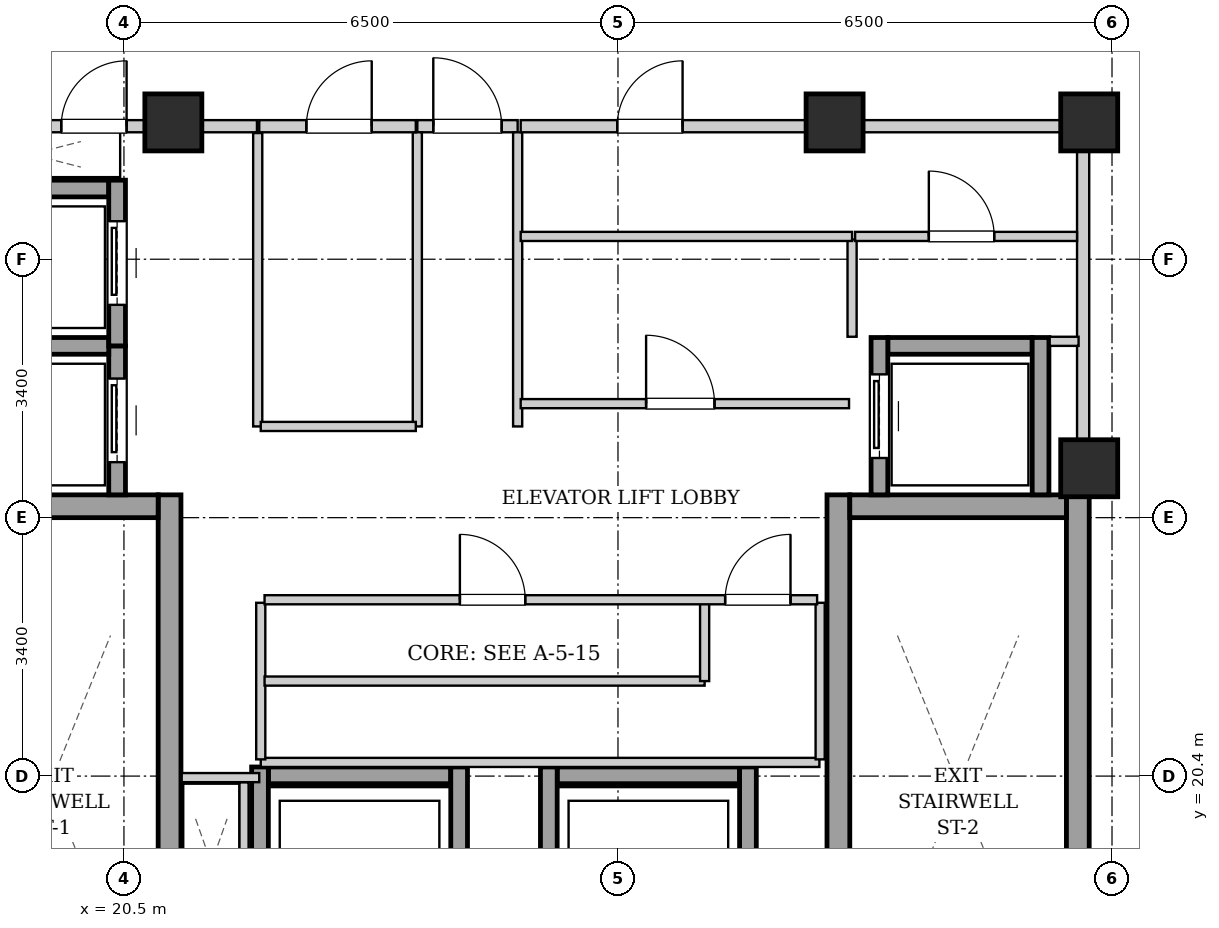
"""IFC4 building model, lengths in metres.
Left out: names, types, materials, properties, quantities, classifications, styles, units other than length and angle.
Written with IfcOpenShell. Run it as: python <this file> out.ifc"""

import sys

from ifc_helpers import new_model, si_unit, direction, frame, frame_2d, origin, origin_2d, place, context, subcontext, project, spatial, rectangle, extrude, element, fill, save


model = new_model("IFC4")
c1 = context("Model", 3, precision=1e-05, world=origin(), true_north=direction((0.0, 1.0)))
c2 = subcontext(c1, "Body", "Model", "MODEL_VIEW")
j1 = project(units=[si_unit("LENGTHUNIT", "METRE"), si_unit("PLANEANGLEUNIT", "RADIAN")], contexts=[c1])
p1 = place(None, origin())
s1 = spatial("IfcSite", under=j1, at=p1, CompositionType="ELEMENT")
p2 = place(p1, origin())
s2 = spatial("IfcBuilding", under=s1, at=p2, CompositionType="ELEMENT")
p3 = place(p2, frame((0.0, 0.0, 220.7)))
s3 = spatial("IfcBuildingStorey", under=s2, at=p3, CompositionType="ELEMENT", Elevation=220.7)
for number, where, z_axis, x_axis in (
    (1, (21.15, 29.0, 0.0), (0.0, 0.0, 1.0), (1.0, 0.0, 0.0)),
    (2, (29.85, 29.0, 0.0), (0.0, 0.0, 1.0), (1.0, 0.0, 0.0)),
    (3, (33.2, 29.0, 0.0), (0.0, 0.0, 1.0), (1.0, 0.0, 0.0)),
    (4, (33.2, 24.45, 0.0), (0.0, 0.0, 1.0), (1.0, 0.0, 0.0)),
):
    element("IfcColumn", number, at=place(p3, frame(where, z_axis=z_axis, x_axis=x_axis)), inside=s3, PredefinedType="COLUMN", context=c2, shape_type="SweptSolid", body=[
        extrude(rectangle(XDim=0.75, YDim=0.75, at=origin_2d()), origin(), (0.0, 0.0, 1.0), 3.4),
    ])
p4 = place(p3, frame((21.1, 15.1, 0.0), z_axis=(0.0, 0.0, 1.0), x_axis=(0.0, 1.0, 0.0)))
e5 = element("IfcWall", 5, at=p4, inside=s3, PredefinedType="SHEAR", context=c2, shape_type="SweptSolid", body=[
    extrude(rectangle(XDim=9.0, YDim=0.3, at=frame_2d((4.5, 0.0))), origin(), (0.0, 0.0, 1.0), 3.14),
])
p5 = place(p3, frame((18.1, 23.95, 0.0), z_axis=(0.0, 0.0, 1.0), x_axis=(1.0, 0.0, 0.0)))
e6 = element("IfcWall", 6, at=p5, inside=s3, PredefinedType="SHEAR", context=c2, shape_type="SweptSolid", body=[
    extrude(rectangle(XDim=2.85, YDim=0.3, at=frame_2d((1.425, 0.0))), origin(), (0.0, 0.0, 1.0), 3.14),
])
for number, where, z_axis, x_axis in (
    (7, (29.9, 15.1, 0.0), (0.0, 0.0, 1.0), (0.0, 1.0, 0.0)),
    (8, (33.05, 15.1, 0.0), (0.0, 0.0, 1.0), (0.0, 1.0, 0.0)),
):
    element("IfcWall", number, at=place(p3, frame(where, z_axis=z_axis, x_axis=x_axis)), inside=s3, PredefinedType="SHEAR", context=c2, shape_type="SweptSolid", body=[
        extrude(rectangle(XDim=9.0, YDim=0.3, at=frame_2d((4.5, 0.0))), origin(), (0.0, 0.0, 1.0), 3.14),
    ])
p6 = place(p3, frame((30.05, 23.95, 0.0), z_axis=(0.0, 0.0, 1.0), x_axis=(1.0, 0.0, 0.0)))
e9 = element("IfcWall", 9, at=p6, inside=s3, PredefinedType="SHEAR", context=c2, shape_type="SweptSolid", body=[
    extrude(rectangle(XDim=2.85, YDim=0.3, at=frame_2d((1.425, 0.0))), origin(), (0.0, 0.0, 1.0), 3.14),
])
p7 = place(p3, frame((20.41, 24.1, 0.0), z_axis=(0.0, 0.0, 1.0), x_axis=(0.0, 1.0, 0.0)))
e10 = element("IfcWall", 10, at=p7, inside=s3, PredefinedType="SHEAR", context=c2, shape_type="SweptSolid", body=[
    extrude(rectangle(XDim=1.96, YDim=0.22, at=frame_2d((0.98, 0.0))), origin(), (0.0, 0.0, 1.0), 3.14),
])
p8 = place(p7, frame((0.43, 0.0, 0.0)))
e11 = element("IfcOpeningElement", 11, at=p8, cuts=e10, PredefinedType="OPENING", context=c2, shape_type="SweptSolid", body=[
    extrude(rectangle(XDim=1.1, YDim=2.15, at=frame_2d((0.55, 1.075))), frame((0.0, 0.12, 0.0), z_axis=(0.0, -1.0, 0.0), x_axis=(1.0, 0.0, 0.0)), (0.0, 0.0, 1.0), 0.24),
])
for number, where, z_axis, x_axis in (
    (12, (18.4, 26.06, 0.0), (0.0, 0.0, 1.0), (1.0, 0.0, 0.0)),
    (13, (18.4, 28.13, 0.0), (0.0, 0.0, 1.0), (1.0, 0.0, 0.0)),
):
    element("IfcWall", number, at=place(p3, frame(where, z_axis=z_axis, x_axis=x_axis)), inside=s3, PredefinedType="SHEAR", context=c2, shape_type="SweptSolid", body=[
        extrude(rectangle(XDim=1.9, YDim=0.22, at=frame_2d((0.95, 0.0))), origin(), (0.0, 0.0, 1.0), 3.14),
    ])
p9 = place(p3, frame((20.41, 26.06, 0.0), z_axis=(0.0, 0.0, 1.0), x_axis=(0.0, 1.0, 0.0)))
e14 = element("IfcWall", 14, at=p9, inside=s3, PredefinedType="SHEAR", context=c2, shape_type="SweptSolid", body=[
    extrude(rectangle(XDim=2.18, YDim=0.22, at=frame_2d((1.09, 0.0))), origin(), (0.0, 0.0, 1.0), 3.14),
])
p10 = place(p9, frame((0.54, 0.0, 0.0)))
e15 = element("IfcOpeningElement", 15, at=p10, cuts=e14, PredefinedType="OPENING", context=c2, shape_type="SweptSolid", body=[
    extrude(rectangle(XDim=1.1, YDim=2.15, at=frame_2d((0.55, 1.075))), frame((0.0, 0.12, 0.0), z_axis=(0.0, -1.0, 0.0), x_axis=(1.0, 0.0, 0.0)), (0.0, 0.0, 1.0), 0.24),
])
p11 = place(p3, frame((30.55, 26.06, 0.0), z_axis=(0.0, 0.0, 1.0), x_axis=(1.0, 0.0, 0.0)))
e16 = element("IfcWall", 16, at=p11, inside=s3, PredefinedType="SHEAR", context=c2, shape_type="SweptSolid", body=[
    extrude(rectangle(XDim=1.9, YDim=0.22, at=frame_2d((0.95, 0.0))), origin(), (0.0, 0.0, 1.0), 3.14),
])
p12 = place(p3, frame((30.44, 24.1, 0.0), z_axis=(0.0, 0.0, 1.0), x_axis=(0.0, 1.0, 0.0)))
e17 = element("IfcWall", 17, at=p12, inside=s3, PredefinedType="SHEAR", context=c2, shape_type="SweptSolid", body=[
    extrude(rectangle(XDim=2.07, YDim=0.22, at=frame_2d((1.035, 0.0))), origin(), (0.0, 0.0, 1.0), 3.14),
])
p13 = place(p12, frame((0.485, 0.0, 0.0)))
e18 = element("IfcOpeningElement", 18, at=p13, cuts=e17, PredefinedType="OPENING", context=c2, shape_type="SweptSolid", body=[
    extrude(rectangle(XDim=1.1, YDim=2.15, at=frame_2d((0.55, 1.075))), frame((0.0, 0.12, 0.0), z_axis=(0.0, -1.0, 0.0), x_axis=(1.0, 0.0, 0.0)), (0.0, 0.0, 1.0), 0.24),
])
p14 = place(p3, frame((32.56, 24.1, 0.0), z_axis=(0.0, 0.0, 1.0), x_axis=(0.0, 1.0, 0.0)))
e19 = element("IfcWall", 19, at=p14, inside=s3, PredefinedType="SHEAR", context=c2, shape_type="SweptSolid", body=[
    extrude(rectangle(XDim=2.07, YDim=0.22, at=frame_2d((1.035, 0.0))), origin(), (0.0, 0.0, 1.0), 3.14),
])
p15 = place(p3, frame((22.4, 20.41, 0.0), z_axis=(0.0, 0.0, 1.0), x_axis=(1.0, 0.0, 0.0)))
e20 = element("IfcWall", 20, at=p15, inside=s3, PredefinedType="SHEAR", context=c2, shape_type="SweptSolid", body=[
    extrude(rectangle(XDim=2.4, YDim=0.22, at=frame_2d((1.2, 0.0))), origin(), (0.0, 0.0, 1.0), 3.14),
])
for number, where, z_axis, x_axis in (
    (21, (22.29, 17.98, 0.0), (0.0, 0.0, 1.0), (0.0, 1.0, 0.0)),
    (22, (24.91, 17.98, 0.0), (0.0, 0.0, 1.0), (0.0, 1.0, 0.0)),
):
    element("IfcWall", number, at=place(p3, frame(where, z_axis=z_axis, x_axis=x_axis)), inside=s3, PredefinedType="SHEAR", context=c2, shape_type="SweptSolid", body=[
        extrude(rectangle(XDim=2.54, YDim=0.22, at=frame_2d((1.27, 0.0))), origin(), (0.0, 0.0, 1.0), 3.14),
    ])
p16 = place(p3, frame((26.2, 20.41, 0.0), z_axis=(0.0, 0.0, 1.0), x_axis=(1.0, 0.0, 0.0)))
e23 = element("IfcWall", 23, at=p16, inside=s3, PredefinedType="SHEAR", context=c2, shape_type="SweptSolid", body=[
    extrude(rectangle(XDim=2.4, YDim=0.22, at=frame_2d((1.2, 0.0))), origin(), (0.0, 0.0, 1.0), 3.14),
])
for number, where, z_axis, x_axis in (
    (24, (26.09, 17.98, 0.0), (0.0, 0.0, 1.0), (0.0, 1.0, 0.0)),
    (25, (28.71, 17.98, 0.0), (0.0, 0.0, 1.0), (0.0, 1.0, 0.0)),
):
    element("IfcWall", number, at=place(p3, frame(where, z_axis=z_axis, x_axis=x_axis)), inside=s3, PredefinedType="SHEAR", context=c2, shape_type="SweptSolid", body=[
        extrude(rectangle(XDim=2.54, YDim=0.22, at=frame_2d((1.27, 0.0))), origin(), (0.0, 0.0, 1.0), 3.14),
    ])
p17 = place(p3, frame((33.12, 24.12, 0.0), z_axis=(0.0, 0.0, 1.0), x_axis=(0.0, 1.0, 0.0)))
e26 = element("IfcWall", 26, at=p17, inside=s3, PredefinedType="PARTITIONING", context=c2, shape_type="SweptSolid", body=[
    extrude(rectangle(XDim=4.76, YDim=0.16, at=frame_2d((2.38, 0.0))), origin(), (0.0, 0.0, 1.0), 3.14),
])
p18 = place(p3, frame((24.36, 28.95, 0.0), z_axis=(0.0, 0.0, 1.0), x_axis=(1.0, 0.0, 0.0)))
e27 = element("IfcWall", 27, at=p18, inside=s3, PredefinedType="PARTITIONING", context=c2, shape_type="SweptSolid", body=[
    extrude(rectangle(XDim=1.32, YDim=0.16, at=frame_2d((0.66, 0.0))), origin(), (0.0, 0.0, 1.0), 2.668),
])
p19 = place(p18, frame((0.21, 0.0, 0.0)))
e28 = element("IfcOpeningElement", 28, at=p19, cuts=e27, PredefinedType="OPENING", context=c2, shape_type="SweptSolid", body=[
    extrude(rectangle(XDim=0.9, YDim=2.05, at=frame_2d((0.45, 1.025))), frame((0.0, 0.09, 0.0), z_axis=(0.0, -1.0, 0.0), x_axis=(1.0, 0.0, 0.0)), (0.0, 0.0, 1.0), 0.18),
])
p20 = place(p3, frame((17.96, 28.95, 0.0), z_axis=(0.0, 0.0, 1.0), x_axis=(1.0, 0.0, 0.0)))
e29 = element("IfcWall", 29, at=p20, inside=s3, PredefinedType="PARTITIONING", context=c2, shape_type="SweptSolid", body=[
    extrude(rectangle(XDim=4.29, YDim=0.16, at=frame_2d((2.145, 0.0))), origin(), (0.0, 0.0, 1.0), 2.668),
])
p21 = place(p20, frame((1.715, 0.0, 0.0)))
e30 = element("IfcOpeningElement", 30, at=p21, cuts=e29, PredefinedType="OPENING", context=c2, shape_type="SweptSolid", body=[
    extrude(rectangle(XDim=0.86, YDim=2.05, at=frame_2d((0.43, 1.025))), frame((0.0, 0.09, 0.0), z_axis=(0.0, -1.0, 0.0), x_axis=(1.0, 0.0, 0.0)), (0.0, 0.0, 1.0), 0.18),
])
p22 = place(p3, frame((22.08, 18.2, 0.0), z_axis=(0.0, 0.0, 1.0), x_axis=(0.0, 1.0, 0.0)))
e31 = element("IfcWall", 31, at=p22, inside=s3, PredefinedType="PARTITIONING", context=c2, shape_type="SweptSolid", body=[
    extrude(rectangle(XDim=2.12, YDim=0.12, at=frame_2d((1.06, 0.0))), origin(), (0.0, 0.0, 1.0), 3.14),
])
p23 = place(p3, frame((22.28, 20.38, 0.0), z_axis=(0.0, 0.0, 1.0), x_axis=(-1.0, 0.0, 0.0)))
e32 = element("IfcWall", 32, at=p23, inside=s3, PredefinedType="PARTITIONING", context=c2, shape_type="SweptSolid", body=[
    extrude(rectangle(XDim=1.02, YDim=0.12, at=frame_2d((0.51, 0.0))), origin(), (0.0, 0.0, 1.0), 3.14),
])
for number, where, z_axis, x_axis in (
    (33, (24.36, 25.0, 0.0), (0.0, 0.0, 1.0), (0.0, 1.0, 0.0)),
    (34, (25.68, 25.0, 0.0), (0.0, 0.0, 1.0), (0.0, 1.0, 0.0)),
):
    element("IfcWall", number, at=place(p3, frame(where, z_axis=z_axis, x_axis=x_axis)), inside=s3, PredefinedType="PARTITIONING", context=c2, shape_type="SweptSolid", body=[
        extrude(rectangle(XDim=3.87, YDim=0.12, at=frame_2d((1.935, 0.0))), origin(), (0.0, 0.0, 1.0), 3.14),
    ])
p24 = place(p3, frame((30.08, 26.18, 0.0), z_axis=(0.0, 0.0, 1.0), x_axis=(0.0, 1.0, 0.0)))
e35 = element("IfcWall", 35, at=p24, inside=s3, PredefinedType="PARTITIONING", context=c2, shape_type="SweptSolid", body=[
    extrude(rectangle(XDim=1.28, YDim=0.12, at=frame_2d((0.64, 0.0))), origin(), (0.0, 0.0, 1.0), 3.14),
])
p25 = place(p3, frame((32.68, 26.12, 0.0), z_axis=(0.0, 0.0, 1.0), x_axis=(1.0, 0.0, 0.0)))
e36 = element("IfcWall", 36, at=p25, inside=s3, PredefinedType="PARTITIONING", context=c2, shape_type="SweptSolid", body=[
    extrude(rectangle(XDim=0.38, YDim=0.12, at=frame_2d((0.19, 0.0))), origin(), (0.0, 0.0, 1.0), 3.14),
])
p26 = place(p3, frame((30.12, 27.5, 0.0), z_axis=(0.0, 0.0, 1.0), x_axis=(1.0, 0.0, 0.0)))
e37 = element("IfcWall", 37, at=p26, inside=s3, PredefinedType="PARTITIONING", context=c2, shape_type="SweptSolid", body=[
    extrude(rectangle(XDim=2.92, YDim=0.12, at=frame_2d((1.46, 0.0))), origin(), (0.0, 0.0, 1.0), 3.14),
])
p27 = place(p26, frame((0.97, 0.0, 0.0)))
e38 = element("IfcOpeningElement", 38, at=p27, cuts=e37, PredefinedType="OPENING", context=c2, shape_type="SweptSolid", body=[
    extrude(rectangle(XDim=0.86, YDim=2.05, at=frame_2d((0.43, 1.025))), frame((0.0, 0.07, 0.0), z_axis=(0.0, -1.0, 0.0), x_axis=(1.0, 0.0, 0.0)), (0.0, 0.0, 1.0), 0.14),
])
p28 = place(p3, frame((22.26, 25.0, 0.0), z_axis=(0.0, 0.0, 1.0), x_axis=(0.0, 1.0, 0.0)))
e39 = element("IfcWall", 39, at=p28, inside=s3, PredefinedType="PARTITIONING", context=c2, shape_type="SweptSolid", body=[
    extrude(rectangle(XDim=3.86, YDim=0.12, at=frame_2d((1.93, 0.0))), origin(), (0.0, 0.0, 1.0), 3.14),
])
p29 = place(p3, frame((22.3, 25.0, 0.0), z_axis=(0.0, 0.0, 1.0), x_axis=(1.0, 0.0, 0.0)))
e40 = element("IfcWall", 40, at=p29, inside=s3, PredefinedType="PARTITIONING", context=c2, shape_type="SweptSolid", body=[
    extrude(rectangle(XDim=2.04, YDim=0.12, at=frame_2d((1.02, 0.0))), origin(), (0.0, 0.0, 1.0), 3.14),
])
p30 = place(p3, frame((22.28, 28.95, 0.0), z_axis=(0.0, 0.0, 1.0), x_axis=(1.0, 0.0, 0.0)))
e41 = element("IfcWall", 41, at=p30, inside=s3, PredefinedType="PARTITIONING", context=c2, shape_type="SweptSolid", body=[
    extrude(rectangle(XDim=2.06, YDim=0.16, at=frame_2d((1.03, 0.0))), origin(), (0.0, 0.0, 1.0), 2.668),
])
p31 = place(p30, frame((0.62, 0.0, 0.0)))
e42 = element("IfcOpeningElement", 42, at=p31, cuts=e41, PredefinedType="OPENING", context=c2, shape_type="SweptSolid", body=[
    extrude(rectangle(XDim=0.86, YDim=2.05, at=frame_2d((0.43, 1.025))), frame((0.0, 0.09, 0.0), z_axis=(0.0, -1.0, 0.0), x_axis=(1.0, 0.0, 0.0)), (0.0, 0.0, 1.0), 0.18),
])
p32 = place(p3, frame((25.72, 27.5, 0.0), z_axis=(0.0, 0.0, 1.0), x_axis=(1.0, 0.0, 0.0)))
e43 = element("IfcWall", 43, at=p32, inside=s3, PredefinedType="PARTITIONING", context=c2, shape_type="SweptSolid", body=[
    extrude(rectangle(XDim=4.36, YDim=0.12, at=frame_2d((2.18, 0.0))), origin(), (0.0, 0.0, 1.0), 3.14),
])
p33 = place(p3, frame((25.72, 25.3, 0.0), z_axis=(0.0, 0.0, 1.0), x_axis=(1.0, 0.0, 0.0)))
e44 = element("IfcWall", 44, at=p33, inside=s3, PredefinedType="PARTITIONING", context=c2, shape_type="SweptSolid", body=[
    extrude(rectangle(XDim=4.32, YDim=0.12, at=frame_2d((2.16, 0.0))), origin(), (0.0, 0.0, 1.0), 3.14),
])
p34 = place(p33, frame((1.65, 0.0, 0.0)))
e45 = element("IfcOpeningElement", 45, at=p34, cuts=e44, PredefinedType="OPENING", context=c2, shape_type="SweptSolid", body=[
    extrude(rectangle(XDim=0.9, YDim=2.05, at=frame_2d((0.45, 1.025))), frame((0.0, 0.07, 0.0), z_axis=(0.0, -1.0, 0.0), x_axis=(1.0, 0.0, 0.0)), (0.0, 0.0, 1.0), 0.14),
])
p35 = place(p3, frame((25.72, 28.95, 0.0), z_axis=(0.0, 0.0, 1.0), x_axis=(1.0, 0.0, 0.0)))
e46 = element("IfcWall", 46, at=p35, inside=s3, PredefinedType="PARTITIONING", context=c2, shape_type="SweptSolid", body=[
    extrude(rectangle(XDim=7.32, YDim=0.16, at=frame_2d((3.66, 0.0))), origin(), (0.0, 0.0, 1.0), 2.668),
])
p36 = place(p35, frame((1.27, 0.0, 0.0)))
e47 = element("IfcOpeningElement", 47, at=p36, cuts=e46, PredefinedType="OPENING", context=c2, shape_type="SweptSolid", body=[
    extrude(rectangle(XDim=0.86, YDim=2.05, at=frame_2d((0.43, 1.025))), frame((0.0, 0.09, 0.0), z_axis=(0.0, -1.0, 0.0), x_axis=(1.0, 0.0, 0.0)), (0.0, 0.0, 1.0), 0.18),
])
p37 = place(p3, frame((22.3, 20.58, 0.0), z_axis=(0.0, 0.0, 1.0), x_axis=(1.0, 0.0, 0.0)))
e48 = element("IfcWall", 48, at=p37, inside=s3, PredefinedType="PARTITIONING", context=c2, shape_type="SweptSolid", body=[
    extrude(rectangle(XDim=7.35, YDim=0.12, at=frame_2d((3.675, 0.0))), origin(), (0.0, 0.0, 1.0), 3.14),
])
for number, where, z_axis, x_axis in (
    (49, (22.3, 20.62, 0.0), (0.0, 0.0, 1.0), (0.0, 1.0, 0.0)),
    (50, (29.66, 20.62, 0.0), (0.0, 0.0, 1.0), (0.0, 1.0, 0.0)),
):
    element("IfcWall", number, at=place(p3, frame(where, z_axis=z_axis, x_axis=x_axis)), inside=s3, PredefinedType="PARTITIONING", context=c2, shape_type="SweptSolid", body=[
        extrude(rectangle(XDim=2.06, YDim=0.12, at=frame_2d((1.03, 0.0))), origin(), (0.0, 0.0, 1.0), 3.14),
    ])
p38 = place(p3, frame((22.35, 21.65, 0.0), z_axis=(0.0, 0.0, 1.0), x_axis=(1.0, 0.0, 0.0)))
e51 = element("IfcWall", 51, at=p38, inside=s3, PredefinedType="PARTITIONING", context=c2, shape_type="SweptSolid", body=[
    extrude(rectangle(XDim=5.79, YDim=0.12, at=frame_2d((2.895, 0.0))), origin(), (0.0, 0.0, 1.0), 3.14),
])
p39 = place(p3, frame((28.14, 21.65, 0.0), z_axis=(0.0, 0.0, 1.0), x_axis=(0.0, 1.0, 0.0)))
e52 = element("IfcWall", 52, at=p39, inside=s3, PredefinedType="PARTITIONING", context=c2, shape_type="SweptSolid", body=[
    extrude(rectangle(XDim=1.03, YDim=0.12, at=frame_2d((0.515, 0.0))), origin(), (0.0, 0.0, 1.0), 3.14),
])
p40 = place(p3, frame((22.35, 22.72, 0.0), z_axis=(0.0, 0.0, 1.0), x_axis=(1.0, 0.0, 0.0)))
e53 = element("IfcWall", 53, at=p40, inside=s3, PredefinedType="PARTITIONING", context=c2, shape_type="SweptSolid", body=[
    extrude(rectangle(XDim=7.27, YDim=0.12, at=frame_2d((3.635, 0.0))), origin(), (0.0, 0.0, 1.0), 3.14),
])
p41 = place(p40, frame((2.57, 0.0, 0.0)))
e54 = element("IfcOpeningElement", 54, at=p41, cuts=e53, PredefinedType="OPENING", context=c2, shape_type="SweptSolid", body=[
    extrude(rectangle(XDim=0.86, YDim=2.05, at=frame_2d((0.43, 1.025))), frame((0.0, 0.07, 0.0), z_axis=(0.0, -1.0, 0.0), x_axis=(1.0, 0.0, 0.0)), (0.0, 0.0, 1.0), 0.14),
])
p42 = place(p40, frame((6.06, 0.0, 0.0)))
e55 = element("IfcOpeningElement", 55, at=p42, cuts=e53, PredefinedType="OPENING", context=c2, shape_type="SweptSolid", body=[
    extrude(rectangle(XDim=0.86, YDim=2.05, at=frame_2d((0.43, 1.025))), frame((0.0, 0.07, 0.0), z_axis=(0.0, -1.0, 0.0), x_axis=(1.0, 0.0, 0.0)), (0.0, 0.0, 1.0), 0.14),
])
p43 = place(p8, origin())
e56 = element("IfcDoor", 56, at=p43, inside=s3, OperationType="SLIDING_TO_LEFT", PredefinedType="DOOR", context=c2, shape_type="SweptSolid", body=[
    extrude(rectangle(XDim=1.1, YDim=2.15, at=frame_2d((0.55, 1.075))), frame((0.0, 0.025, 0.0), z_axis=(0.0, -1.0, 0.0), x_axis=(1.0, 0.0, 0.0)), (0.0, 0.0, 1.0), 0.05),
])
fill(e11, e56)
p44 = place(p10, origin())
e57 = element("IfcDoor", 57, at=p44, inside=s3, OperationType="SLIDING_TO_LEFT", PredefinedType="DOOR", context=c2, shape_type="SweptSolid", body=[
    extrude(rectangle(XDim=1.1, YDim=2.15, at=frame_2d((0.55, 1.075))), frame((0.0, 0.025, 0.0), z_axis=(0.0, -1.0, 0.0), x_axis=(1.0, 0.0, 0.0)), (0.0, 0.0, 1.0), 0.05),
])
fill(e15, e57)
p45 = place(p13, origin())
e58 = element("IfcDoor", 58, at=p45, inside=s3, OperationType="SLIDING_TO_LEFT", PredefinedType="DOOR", context=c2, shape_type="SweptSolid", body=[
    extrude(rectangle(XDim=1.1, YDim=2.15, at=frame_2d((0.55, 1.075))), frame((0.0, 0.025, 0.0), z_axis=(0.0, -1.0, 0.0), x_axis=(1.0, 0.0, 0.0)), (0.0, 0.0, 1.0), 0.05),
])
fill(e18, e58)
p46 = place(p19, origin())
e59 = element("IfcDoor", 59, at=p46, inside=s3, OperationType="SINGLE_SWING_LEFT", PredefinedType="DOOR", context=c2, shape_type="SweptSolid", body=[
    extrude(rectangle(XDim=0.9, YDim=2.05, at=frame_2d((0.45, 1.025))), frame((0.0, 0.025, 0.0), z_axis=(0.0, -1.0, 0.0), x_axis=(1.0, 0.0, 0.0)), (0.0, 0.0, 1.0), 0.05),
])
fill(e28, e59)
p47 = place(p21, origin())
e60 = element("IfcDoor", 60, at=p47, inside=s3, OperationType="SINGLE_SWING_RIGHT", PredefinedType="DOOR", context=c2, shape_type="SweptSolid", body=[
    extrude(rectangle(XDim=0.86, YDim=2.05, at=frame_2d((0.43, 1.025))), frame((0.0, 0.025, 0.0), z_axis=(0.0, -1.0, 0.0), x_axis=(1.0, 0.0, 0.0)), (0.0, 0.0, 1.0), 0.05),
])
fill(e30, e60)
p48 = place(p27, origin())
e61 = element("IfcDoor", 61, at=p48, inside=s3, OperationType="SINGLE_SWING_LEFT", PredefinedType="DOOR", context=c2, shape_type="SweptSolid", body=[
    extrude(rectangle(XDim=0.86, YDim=2.05, at=frame_2d((0.43, 1.025))), frame((0.0, 0.025, 0.0), z_axis=(0.0, -1.0, 0.0), x_axis=(1.0, 0.0, 0.0)), (0.0, 0.0, 1.0), 0.05),
])
fill(e38, e61)
p49 = place(p31, origin())
e62 = element("IfcDoor", 62, at=p49, inside=s3, OperationType="SINGLE_SWING_RIGHT", PredefinedType="DOOR", context=c2, shape_type="SweptSolid", body=[
    extrude(rectangle(XDim=0.86, YDim=2.05, at=frame_2d((0.43, 1.025))), frame((0.0, 0.025, 0.0), z_axis=(0.0, -1.0, 0.0), x_axis=(1.0, 0.0, 0.0)), (0.0, 0.0, 1.0), 0.05),
])
fill(e42, e62)
p50 = place(p34, origin())
e63 = element("IfcDoor", 63, at=p50, inside=s3, OperationType="SINGLE_SWING_LEFT", PredefinedType="DOOR", context=c2, shape_type="SweptSolid", body=[
    extrude(rectangle(XDim=0.9, YDim=2.05, at=frame_2d((0.45, 1.025))), frame((0.0, 0.025, 0.0), z_axis=(0.0, -1.0, 0.0), x_axis=(1.0, 0.0, 0.0)), (0.0, 0.0, 1.0), 0.05),
])
fill(e45, e63)
p51 = place(p36, origin())
e64 = element("IfcDoor", 64, at=p51, inside=s3, OperationType="SINGLE_SWING_RIGHT", PredefinedType="DOOR", context=c2, shape_type="SweptSolid", body=[
    extrude(rectangle(XDim=0.86, YDim=2.05, at=frame_2d((0.43, 1.025))), frame((0.0, 0.025, 0.0), z_axis=(0.0, -1.0, 0.0), x_axis=(1.0, 0.0, 0.0)), (0.0, 0.0, 1.0), 0.05),
])
fill(e47, e64)
p52 = place(p41, origin())
e65 = element("IfcDoor", 65, at=p52, inside=s3, OperationType="SINGLE_SWING_LEFT", PredefinedType="DOOR", context=c2, shape_type="SweptSolid", body=[
    extrude(rectangle(XDim=0.86, YDim=2.05, at=frame_2d((0.43, 1.025))), frame((0.0, 0.025, 0.0), z_axis=(0.0, -1.0, 0.0), x_axis=(1.0, 0.0, 0.0)), (0.0, 0.0, 1.0), 0.05),
])
fill(e54, e65)
p53 = place(p42, origin())
e66 = element("IfcDoor", 66, at=p53, inside=s3, OperationType="SINGLE_SWING_RIGHT", PredefinedType="DOOR", context=c2, shape_type="SweptSolid", body=[
    extrude(rectangle(XDim=0.86, YDim=2.05, at=frame_2d((0.43, 1.025))), frame((0.0, 0.025, 0.0), z_axis=(0.0, -1.0, 0.0), x_axis=(1.0, 0.0, 0.0)), (0.0, 0.0, 1.0), 0.05),
])
fill(e55, e66)
save(model, sys.argv[1])
